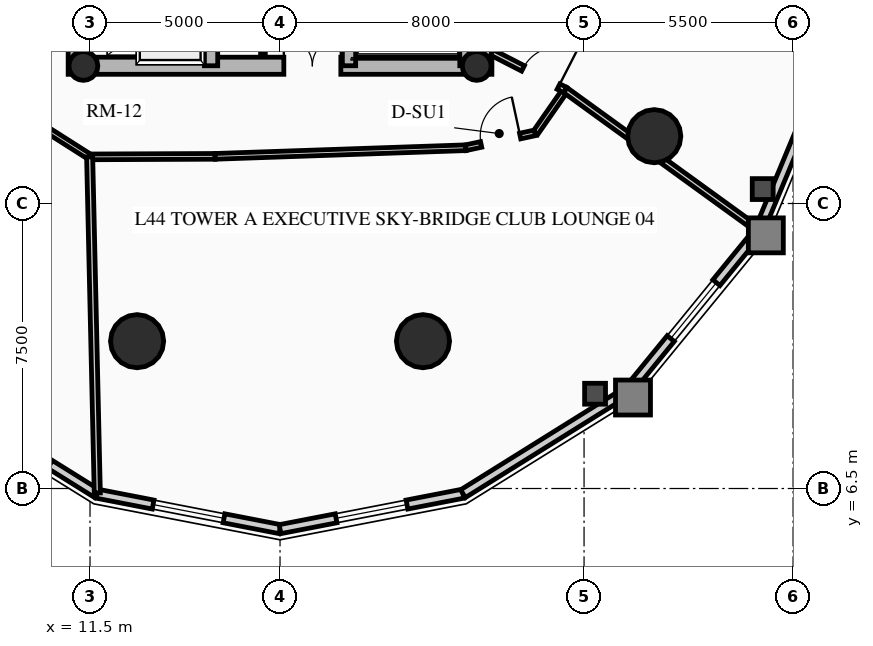
"""IFC4 building model, lengths in metres.
Left out: names, types, materials, properties, quantities, classifications, styles, units other than length and angle.
Written with IfcOpenShell. Run it as: python <this file> out.ifc"""

import sys

from ifc_helpers import new_model, si_unit, direction, frame, frame_2d, origin, origin_2d, place, context, subcontext, project, spatial, rectangle, circle, hollow_circle, extrude, source, transform, mapped, element, fill, save


model = new_model("IFC4")
c1 = context("Model", 3, precision=1e-05, world=origin(), true_north=direction((0.0, 1.0)))
c2 = subcontext(c1, "Body", "Model", "MODEL_VIEW")
j1 = project(units=[si_unit("LENGTHUNIT", "METRE"), si_unit("PLANEANGLEUNIT", "RADIAN")], contexts=[c1])
p1 = place(None, origin())
s1 = spatial("IfcSite", under=j1, at=p1, CompositionType="ELEMENT")
p2 = place(p1, origin())
s2 = spatial("IfcBuilding", under=s1, at=p2, CompositionType="ELEMENT")
p3 = place(p2, frame((0.0, 0.0, 140.32)))
s3 = spatial("IfcBuildingStorey", under=s2, at=p3, CompositionType="ELEMENT", Elevation=140.32)
for number, where, z_axis, x_axis in (
    (1, (11.15, 17.4, 0.0), (0.0, 0.0, 1.0), (0.0, 1.0, 0.0)),
    (2, (21.85, 17.4, 0.0), (0.0, 0.0, 1.0), (0.0, 1.0, 0.0)),
):
    element("IfcWall", number, at=place(p3, frame(where, z_axis=z_axis, x_axis=x_axis)), inside=s3, PredefinedType="SHEAR", context=c2, shape_type="SweptSolid", body=[
        extrude(rectangle(XDim=14.2, YDim=0.45, at=frame_2d((7.1, 0.0))), origin(), (0.0, 0.0, 1.0), 3.72),
    ])
p4 = place(p3, frame((11.15, 17.625, 0.0), z_axis=(0.0, 0.0, 1.0), x_axis=(1.0, 0.0, 0.0)))
e3 = element("IfcWall", 3, at=p4, inside=s3, PredefinedType="SHEAR", context=c2, shape_type="SweptSolid", body=[
    extrude(rectangle(XDim=10.7, YDim=0.45, at=frame_2d((5.35, 0.0))), origin(), (0.0, 0.0, 1.0), 3.72),
])
m1 = source(origin(), c2, "Body", "SweptSolid", [
    extrude(rectangle(XDim=1.5, YDim=2.02, at=frame_2d((0.75, 1.01))), frame((0.0, 0.235, 0.0), z_axis=(0.0, -1.0, 0.0), x_axis=(1.0, 0.0, 0.0)), (0.0, 0.0, 1.0), 0.47),
])
p5 = place(p4, frame((5.45, 0.0, 0.0)))
e4 = element("IfcOpeningElement", 4, at=p5, cuts=e3, PredefinedType="OPENING", context=c2, shape_type="MappedRepresentation", body=[
    mapped(m1, transform((0.0, 0.0, 0.0), x_axis=(1.0, 0.0, 0.0), y_axis=(0.0, 1.0, 0.0), z_axis=(0.0, 0.0, 1.0), scale=1.0)),
])
p6 = place(p3, frame((14.685, 17.625, 0.0), z_axis=(0.0, 0.0, 1.0), x_axis=(0.0, 1.0, 0.0)))
e5 = element("IfcWall", 5, at=p6, inside=s3, PredefinedType="SHEAR", context=c2, shape_type="SweptSolid", body=[
    extrude(rectangle(XDim=13.75, YDim=0.35, at=frame_2d((6.875, 0.0))), origin(), (0.0, 0.0, 1.0), 3.72),
])
m2 = source(origin(), c2, "Body", "SweptSolid", [
    extrude(rectangle(XDim=1.1, YDim=2.015, at=frame_2d((0.55, 1.007))), frame((0.0, 0.185, 0.0), z_axis=(0.0, -1.0, 0.0), x_axis=(1.0, 0.0, 0.0)), (0.0, 0.0, 1.0), 0.37),
])
p7 = place(p6, frame((4.875, 0.0, 0.0)))
e6 = element("IfcOpeningElement", 6, at=p7, cuts=e5, PredefinedType="OPENING", context=c2, shape_type="MappedRepresentation", body=[
    mapped(m2, transform((0.0, 0.0, 0.0), x_axis=(1.0, 0.0, 0.0), y_axis=(0.0, 1.0, 0.0), z_axis=(0.0, 0.0, 1.0), scale=1.0)),
])
p8 = place(p6, frame((0.65, 0.0, 0.0)))
e7 = element("IfcOpeningElement", 7, at=p8, cuts=e5, PredefinedType="OPENING", context=c2, shape_type="MappedRepresentation", body=[
    mapped(m2, transform((0.0, 0.0, 0.0), x_axis=(1.0, 0.0, 0.0), y_axis=(0.0, 1.0, 0.0), z_axis=(0.0, 0.0, 1.0), scale=1.0)),
])
p9 = place(p6, frame((2.65, 0.0, 0.0)))
e8 = element("IfcOpeningElement", 8, at=p9, cuts=e5, PredefinedType="OPENING", context=c2, shape_type="MappedRepresentation", body=[
    mapped(m2, transform((0.0, 0.0, 0.0), x_axis=(1.0, 0.0, 0.0), y_axis=(0.0, 1.0, 0.0), z_axis=(0.0, 0.0, 1.0), scale=1.0)),
])
m3 = source(origin(), c2, "Body", "SweptSolid", [
    extrude(rectangle(XDim=1.15, YDim=2.02, at=frame_2d((0.575, 1.01))), frame((0.0, 0.185, 0.0), z_axis=(0.0, -1.0, 0.0), x_axis=(1.0, 0.0, 0.0)), (0.0, 0.0, 1.0), 0.37),
])
p10 = place(p6, frame((7.295, 0.0, 0.0)))
e9 = element("IfcOpeningElement", 9, at=p10, cuts=e5, PredefinedType="OPENING", context=c2, shape_type="MappedRepresentation", body=[
    mapped(m3, transform((0.0, 0.0, 0.0), x_axis=(1.0, 0.0, 0.0), y_axis=(0.0, 1.0, 0.0), z_axis=(0.0, 0.0, 1.0), scale=1.0)),
])
p11 = place(p3, frame((18.315, 17.625, 0.0), z_axis=(0.0, 0.0, 1.0), x_axis=(0.0, 1.0, 0.0)))
e10 = element("IfcWall", 10, at=p11, inside=s3, PredefinedType="SHEAR", context=c2, shape_type="SweptSolid", body=[
    extrude(rectangle(XDim=9.625, YDim=0.35, at=frame_2d((4.812, 0.0))), origin(), (0.0, 0.0, 1.0), 3.72),
])
p12 = place(p11, frame((5.305, 0.0, 0.0)))
e11 = element("IfcOpeningElement", 11, at=p12, cuts=e10, PredefinedType="OPENING", context=c2, shape_type="MappedRepresentation", body=[
    mapped(m3, transform((0.0, 0.0, 0.0), x_axis=(1.0, 0.0, 0.0), y_axis=(0.0, 1.0, 0.0), z_axis=(0.0, 0.0, 1.0), scale=1.0)),
])
p13 = place(p3, frame((21.405, 17.625, 0.0), z_axis=(0.0, 0.0, 1.0), x_axis=(0.0, 1.0, 0.0)))
e12 = element("IfcWall", 12, at=p13, inside=s3, PredefinedType="SHEAR", context=c2, shape_type="SweptSolid", body=[
    extrude(rectangle(XDim=6.72, YDim=0.35, at=frame_2d((3.36, 0.0))), origin(), (0.0, 0.0, 1.0), 3.72),
])
for number, where, z_axis, x_axis in (
    (13, (11.325, 17.62, 0.0), (0.0, 0.0, 1.0), (1.0, 0.0, 0.0)),
    (14, (21.675, 17.62, 0.0), (0.0, 0.0, 1.0), (1.0, 0.0, 0.0)),
):
    element("IfcColumn", number, at=place(p3, frame(where, z_axis=z_axis, x_axis=x_axis)), inside=s3, PredefinedType="COLUMN", context=c2, shape_type="SweptSolid", body=[
        extrude(hollow_circle(Radius=0.38, WallThickness=0.032, at=origin_2d()), origin(), (0.0, 0.0, 1.0), 3.72),
    ])
for number, where, z_axis, x_axis in (
    (15, (12.739, 10.377, 0.0), (0.0, 0.0, 1.0), (1.0, 0.0, 0.0)),
    (16, (20.261, 10.377, 0.0), (0.0, 0.0, 1.0), (1.0, 0.0, 0.0)),
    (17, (26.347, 15.771, 0.0), (0.0, 0.0, 1.0), (1.0, 0.0, 0.0)),
):
    element("IfcColumn", number, at=place(p3, frame(where, z_axis=z_axis, x_axis=x_axis)), inside=s3, PredefinedType="USERDEFINED", context=c2, shape_type="SweptSolid", body=[
        extrude(circle(Radius=0.7, at=origin_2d()), origin(), (0.0, 0.0, 1.0), 3.72),
    ])
p14 = place(p3, frame((11.685, 6.363, 0.0), z_axis=(0.0, 0.0, 1.0), x_axis=(-0.848520380187, 0.529162701263, 0.0)))
e18 = element("IfcWall", 18, at=p14, inside=s3, PredefinedType="SOLIDWALL", context=c2, shape_type="SweptSolid", body=[
    extrude(rectangle(XDim=5.119, YDim=0.24, at=frame_2d((2.56, 0.0))), origin(), (0.0, 0.0, 1.0), 3.465),
])
m4 = source(origin(), c2, "Body", "SweptSolid", [
    extrude(rectangle(XDim=2.2, YDim=1.35, at=frame_2d((1.1, 0.675))), frame((0.0, 0.13, 0.0), z_axis=(0.0, -1.0, 0.0), x_axis=(1.0, 0.0, 0.0)), (0.0, 0.0, 1.0), 0.26),
])
p15 = place(p14, frame((1.459, 0.0, 0.65)))
e19 = element("IfcOpeningElement", 19, at=p15, cuts=e18, PredefinedType="OPENING", context=c2, shape_type="MappedRepresentation", body=[
    mapped(m4, transform((0.0, 0.0, 0.0), x_axis=(1.0, 0.0, 0.0), y_axis=(0.0, 1.0, 0.0), z_axis=(0.0, 0.0, 1.0), scale=1.0)),
])
p16 = place(p3, frame((16.5, 5.43, 0.0), z_axis=(0.0, 0.0, 1.0), x_axis=(-0.981723785992, 0.190311344954, 0.0)))
e20 = element("IfcWall", 20, at=p16, inside=s3, PredefinedType="SOLIDWALL", context=c2, shape_type="SweptSolid", body=[
    extrude(rectangle(XDim=4.904, YDim=0.24, at=frame_2d((2.452, 0.0))), origin(), (0.0, 0.0, 1.0), 3.465),
])
m5 = source(origin(), c2, "Body", "SweptSolid", [
    extrude(rectangle(XDim=1.9, YDim=1.35, at=frame_2d((0.95, 0.675))), frame((0.0, 0.13, 0.0), z_axis=(0.0, -1.0, 0.0), x_axis=(1.0, 0.0, 0.0)), (0.0, 0.0, 1.0), 0.26),
])
p17 = place(p16, frame((1.502, 0.0, 0.65)))
e21 = element("IfcOpeningElement", 21, at=p17, cuts=e20, PredefinedType="OPENING", context=c2, shape_type="MappedRepresentation", body=[
    mapped(m5, transform((0.0, 0.0, 0.0), x_axis=(1.0, 0.0, 0.0), y_axis=(0.0, 1.0, 0.0), z_axis=(0.0, 0.0, 1.0), scale=1.0)),
])
p18 = place(p3, frame((21.315, 6.363, 0.0), z_axis=(0.0, 0.0, 1.0), x_axis=(-0.981723785992, -0.190311344954, 0.0)))
e22 = element("IfcWall", 22, at=p18, inside=s3, PredefinedType="SOLIDWALL", context=c2, shape_type="SweptSolid", body=[
    extrude(rectangle(XDim=4.904, YDim=0.24, at=frame_2d((2.452, 0.0))), origin(), (0.0, 0.0, 1.0), 3.465),
])
p19 = place(p18, frame((1.502, 0.0, 0.65)))
e23 = element("IfcOpeningElement", 23, at=p19, cuts=e22, PredefinedType="OPENING", context=c2, shape_type="MappedRepresentation", body=[
    mapped(m5, transform((0.0, 0.0, 0.0), x_axis=(1.0, 0.0, 0.0), y_axis=(0.0, 1.0, 0.0), z_axis=(0.0, 0.0, 1.0), scale=1.0)),
])
p20 = place(p3, frame((25.658, 9.072, 0.0), z_axis=(0.0, 0.0, 1.0), x_axis=(-0.848520380187, -0.529162701263, 0.0)))
e24 = element("IfcWall", 24, at=p20, inside=s3, PredefinedType="SOLIDWALL", context=c2, shape_type="SweptSolid", body=[
    extrude(rectangle(XDim=5.119, YDim=0.24, at=frame_2d((2.56, 0.0))), origin(), (0.0, 0.0, 1.0), 3.465),
])
p21 = place(p3, frame((29.105, 13.291, 0.0), z_axis=(0.0, 0.0, 1.0), x_axis=(-0.632700781152, -0.77439635945, 0.0)))
e25 = element("IfcWall", 25, at=p21, inside=s3, PredefinedType="SOLIDWALL", context=c2, shape_type="SweptSolid", body=[
    extrude(rectangle(XDim=5.448, YDim=0.24, at=frame_2d((2.724, 0.0))), origin(), (0.0, 0.0, 1.0), 3.465),
])
p22 = place(p21, frame((1.774, 0.0, 0.65)))
e26 = element("IfcOpeningElement", 26, at=p22, cuts=e25, PredefinedType="OPENING", context=c2, shape_type="MappedRepresentation", body=[
    mapped(m5, transform((0.0, 0.0, 0.0), x_axis=(1.0, 0.0, 0.0), y_axis=(0.0, 1.0, 0.0), z_axis=(0.0, 0.0, 1.0), scale=1.0)),
])
p23 = place(p3, frame((31.318, 18.607, 0.0), z_axis=(0.0, 0.0, 1.0), x_axis=(-0.384344417632, -0.923189779317, 0.0)))
e27 = element("IfcWall", 27, at=p23, inside=s3, PredefinedType="SOLIDWALL", context=c2, shape_type="SweptSolid", body=[
    extrude(rectangle(XDim=5.758, YDim=0.24, at=frame_2d((2.879, 0.0))), origin(), (0.0, 0.0, 1.0), 3.465),
])
p24 = place(p3, frame((16.05, 17.92, 0.0), z_axis=(0.0, 0.0, 1.0), x_axis=(0.0, 1.0, 0.0)))
e28 = element("IfcWall", 28, at=p24, inside=s3, PredefinedType="PARTITIONING", context=c2, shape_type="SweptSolid", body=[
    extrude(rectangle(XDim=3.08, YDim=0.125, at=frame_2d((1.54, 0.0))), origin(), (0.0, 0.0, 1.0), 3.465),
])
m6 = source(origin(), c2, "Body", "SweptSolid", [
    extrude(rectangle(XDim=0.9, YDim=2.005, at=frame_2d((0.45, 1.002))), frame((0.0, 0.073, 0.0), z_axis=(0.0, -1.0, 0.0), x_axis=(1.0, 0.0, 0.0)), (0.0, 0.0, 1.0), 0.145),
])
p25 = place(p24, frame((1.05, 0.0, 0.0)))
e29 = element("IfcOpeningElement", 29, at=p25, cuts=e28, PredefinedType="OPENING", context=c2, shape_type="MappedRepresentation", body=[
    mapped(m6, transform((0.0, 0.0, 0.0), x_axis=(1.0, 0.0, 0.0), y_axis=(0.0, 1.0, 0.0), z_axis=(0.0, 0.0, 1.0), scale=1.0)),
])
p26 = place(p3, frame((10.156, 16.075, 0.0), z_axis=(0.0, 0.0, 1.0), x_axis=(0.843896624713, -0.536505812455, 0.0)))
e30 = element("IfcWall", 30, at=p26, inside=s3, PredefinedType="PARTITIONING", context=c2, shape_type="SweptSolid", body=[
    extrude(rectangle(XDim=1.581, YDim=0.15, at=frame_2d((0.791, 0.0))), origin(), (0.0, 0.0, 1.0), 3.035),
])
p27 = place(p3, frame((11.49, 15.227, 0.0), z_axis=(0.0, 0.0, 1.0), x_axis=(0.999991728046, 0.004067411998, 0.0)))
e31 = element("IfcWall", 31, at=p27, inside=s3, PredefinedType="PARTITIONING", context=c2, shape_type="SweptSolid", body=[
    extrude(rectangle(XDim=3.301, YDim=0.15, at=frame_2d((1.651, 0.0))), origin(), (0.0, 0.0, 1.0), 3.035),
])
p28 = place(p3, frame((14.792, 15.24, 0.0), z_axis=(0.0, 0.0, 1.0), x_axis=(0.999408106202, 0.034401122909, 0.0)))
e32 = element("IfcWall", 32, at=p28, inside=s3, PredefinedType="PARTITIONING", context=c2, shape_type="SweptSolid", body=[
    extrude(rectangle(XDim=6.6, YDim=0.15, at=frame_2d((3.3, 0.0))), origin(), (0.0, 0.0, 1.0), 3.035),
])
p29 = place(p3, frame((21.388, 15.468, 0.0), z_axis=(0.0, 0.0, 1.0), x_axis=(0.977672748596, 0.210133283069, 0.0)))
e33 = element("IfcWall", 33, at=p29, inside=s3, PredefinedType="PARTITIONING", context=c2, shape_type="SweptSolid", body=[
    extrude(rectangle(XDim=1.876, YDim=0.15, at=frame_2d((0.938, 0.0))), origin(), (0.0, 0.0, 1.0), 3.035),
])
m7 = source(origin(), c2, "Body", "SweptSolid", [
    extrude(rectangle(XDim=1.05, YDim=2.015, at=frame_2d((0.525, 1.007))), frame((0.0, 0.085, 0.0), z_axis=(0.0, -1.0, 0.0), x_axis=(1.0, 0.0, 0.0)), (0.0, 0.0, 1.0), 0.17),
])
p30 = place(p29, frame((0.413, 0.0, 0.0)))
e34 = element("IfcOpeningElement", 34, at=p30, cuts=e33, PredefinedType="OPENING", context=c2, shape_type="MappedRepresentation", body=[
    mapped(m7, transform((0.0, 0.0, 0.0), x_axis=(1.0, 0.0, 0.0), y_axis=(0.0, 1.0, 0.0), z_axis=(0.0, 0.0, 1.0), scale=1.0)),
])
p31 = place(p3, frame((23.222, 15.862, 0.0), z_axis=(0.0, 0.0, 1.0), x_axis=(0.571941738195, 0.820294244836, 0.0)))
e35 = element("IfcWall", 35, at=p31, inside=s3, PredefinedType="PARTITIONING", context=c2, shape_type="SweptSolid", body=[
    extrude(rectangle(XDim=1.369, YDim=0.15, at=frame_2d((0.685, 0.0))), origin(), (0.0, 0.0, 1.0), 3.035),
])
p32 = place(p3, frame((11.49, 15.227, 0.0), z_axis=(0.0, 0.0, 1.0), x_axis=(0.022711375682, -0.999742063442, 0.0)))
e36 = element("IfcWall", 36, at=p32, inside=s3, PredefinedType="PARTITIONING", context=c2, shape_type="SweptSolid", body=[
    extrude(rectangle(XDim=8.847, YDim=0.16, at=frame_2d((4.423, 0.0))), origin(), (0.0, 0.0, 1.0), 2.989),
])
p33 = place(p3, frame((24.006, 16.985, 0.0), z_axis=(0.0, 0.0, 1.0), x_axis=(0.809849730791, -0.586637378231, 0.0)))
e37 = element("IfcWall", 37, at=p33, inside=s3, PredefinedType="PARTITIONING", context=c2, shape_type="SweptSolid", body=[
    extrude(rectangle(XDim=6.277, YDim=0.16, at=frame_2d((3.139, 0.0))), origin(), (0.0, 0.0, 1.0), 2.989),
])
p34 = place(p3, frame((22.075, 17.975, 0.0), z_axis=(0.0, 0.0, 1.0), x_axis=(0.889835034782, -0.456282380632, 0.0)))
e38 = element("IfcWall", 38, at=p34, inside=s3, PredefinedType="PARTITIONING", context=c2, shape_type="SweptSolid", body=[
    extrude(rectangle(XDim=2.17, YDim=0.16, at=frame_2d((1.085, 0.0))), origin(), (0.0, 0.0, 1.0), 3.035),
])
m8 = source(origin(), c2, "Body", "SweptSolid", [
    extrude(rectangle(XDim=1.05, YDim=2.015, at=frame_2d((0.525, 1.007))), frame((0.0, 0.09, 0.0), z_axis=(0.0, -1.0, 0.0), x_axis=(1.0, 0.0, 0.0)), (0.0, 0.0, 1.0), 0.18),
])
p35 = place(p34, frame((0.92, 0.0, 0.0)))
e39 = element("IfcOpeningElement", 39, at=p35, cuts=e38, PredefinedType="OPENING", context=c2, shape_type="MappedRepresentation", body=[
    mapped(m8, transform((0.0, 0.0, 0.0), x_axis=(1.0, 0.0, 0.0), y_axis=(0.0, 1.0, 0.0), z_axis=(0.0, 0.0, 1.0), scale=1.0)),
])
m9 = source(origin(), c2, "Body", "SweptSolid", [
    extrude(rectangle(XDim=1.9, YDim=1.35, at=frame_2d((0.95, 0.675))), frame((0.0, 0.03, 0.0), z_axis=(0.0, -1.0, 0.0), x_axis=(1.0, 0.0, 0.0)), (0.0, 0.0, 1.0), 0.06),
])
p36 = place(p17, origin())
e40 = element("IfcWindow", 40, at=p36, inside=s3, PartitioningType="DOUBLE_PANEL_VERTICAL", PredefinedType="WINDOW", context=c2, shape_type="MappedRepresentation", body=[
    mapped(m9, transform((0.0, 0.0, 0.0), x_axis=(1.0, 0.0, 0.0), y_axis=(0.0, 1.0, 0.0), z_axis=(0.0, 0.0, 1.0), scale=1.0)),
])
fill(e21, e40)
p37 = place(p19, origin())
e41 = element("IfcWindow", 41, at=p37, inside=s3, PartitioningType="DOUBLE_PANEL_VERTICAL", PredefinedType="WINDOW", context=c2, shape_type="MappedRepresentation", body=[
    mapped(m9, transform((0.0, 0.0, 0.0), x_axis=(1.0, 0.0, 0.0), y_axis=(0.0, 1.0, 0.0), z_axis=(0.0, 0.0, 1.0), scale=1.0)),
])
fill(e23, e41)
p38 = place(p22, origin())
e42 = element("IfcWindow", 42, at=p38, inside=s3, PartitioningType="DOUBLE_PANEL_VERTICAL", PredefinedType="WINDOW", context=c2, shape_type="MappedRepresentation", body=[
    mapped(m9, transform((0.0, 0.0, 0.0), x_axis=(1.0, 0.0, 0.0), y_axis=(0.0, 1.0, 0.0), z_axis=(0.0, 0.0, 1.0), scale=1.0)),
])
fill(e26, e42)
m10 = source(origin(), c2, "Body", "SweptSolid", [
    extrude(rectangle(XDim=1.5, YDim=2.02, at=frame_2d((0.75, 1.01))), frame((0.0, 0.025, 0.0), z_axis=(0.0, -1.0, 0.0), x_axis=(1.0, 0.0, 0.0)), (0.0, 0.0, 1.0), 0.05),
])
p39 = place(p5, origin())
e43 = element("IfcDoor", 43, at=p39, inside=s3, OperationType="DOUBLE_DOOR_SINGLE_SWING", PredefinedType="DOOR", context=c2, shape_type="MappedRepresentation", body=[
    mapped(m10, transform((0.0, 0.0, 0.0), x_axis=(1.0, 0.0, 0.0), y_axis=(0.0, 1.0, 0.0), z_axis=(0.0, 0.0, 1.0), scale=1.0)),
])
fill(e4, e43)
m11 = source(origin(), c2, "Body", "SweptSolid", [
    extrude(rectangle(XDim=1.05, YDim=2.015, at=frame_2d((0.525, 1.007))), frame((0.0, 0.025, 0.0), z_axis=(0.0, -1.0, 0.0), x_axis=(1.0, 0.0, 0.0)), (0.0, 0.0, 1.0), 0.05),
])
p40 = place(p35, origin())
e44 = element("IfcDoor", 44, at=p40, inside=s3, OperationType="SINGLE_SWING_RIGHT", PredefinedType="DOOR", context=c2, shape_type="MappedRepresentation", body=[
    mapped(m11, transform((0.0, 0.0, 0.0), x_axis=(1.0, 0.0, 0.0), y_axis=(0.0, 1.0, 0.0), z_axis=(0.0, 0.0, 1.0), scale=1.0)),
])
fill(e39, e44)
p41 = place(p30, origin())
e45 = element("IfcDoor", 45, at=p41, inside=s3, OperationType="SINGLE_SWING_RIGHT", PredefinedType="DOOR", context=c2, shape_type="MappedRepresentation", body=[
    mapped(m11, transform((0.0, 0.0, 0.0), x_axis=(1.0, 0.0, 0.0), y_axis=(0.0, 1.0, 0.0), z_axis=(0.0, 0.0, 1.0), scale=1.0)),
])
fill(e34, e45)
save(model, sys.argv[1])
